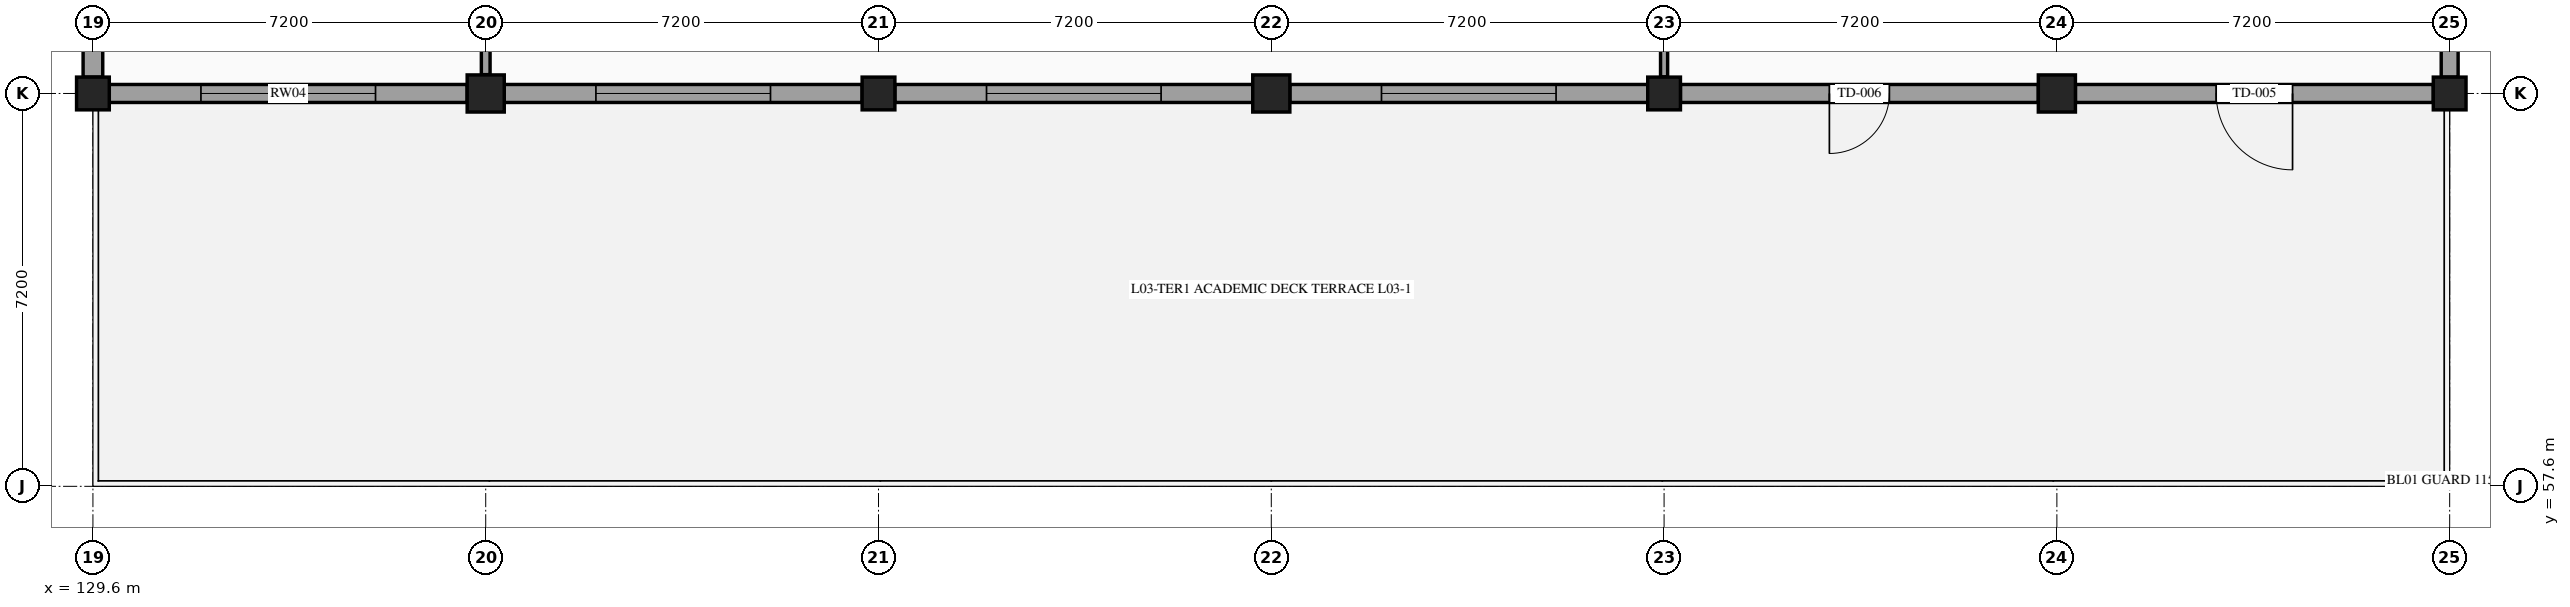
"""IFC4 building model, lengths in metres.
Left out: names, types, materials, properties, quantities, classifications, styles, units other than length and angle.
Written with IfcOpenShell. Run it as: python <this file> out.ifc"""

import sys

from ifc_helpers import new_model, si_unit, direction, frame, frame_2d, origin, origin_2d, place, context, subcontext, project, spatial, rectangle, extrude, element, fill, save


model = new_model("IFC4")
c1 = context("Model", 3, precision=1e-05, world=origin(), true_north=direction((0.0, 1.0)))
c2 = subcontext(c1, "Body", "Model", "MODEL_VIEW")
j1 = project(units=[si_unit("LENGTHUNIT", "METRE"), si_unit("PLANEANGLEUNIT", "RADIAN")], contexts=[c1])
p1 = place(None, origin())
s1 = spatial("IfcSite", under=j1, at=p1, CompositionType="ELEMENT")
p2 = place(p1, origin())
s2 = spatial("IfcBuilding", under=s1, at=p2, CompositionType="ELEMENT")
p3 = place(p2, frame((0.0, 0.0, 14.4)))
s3 = spatial("IfcBuildingStorey", under=s2, at=p3, CompositionType="ELEMENT", Elevation=14.4)
p4 = place(p3, frame((129.6, 64.8, 0.0), z_axis=(0.0, 0.0, 1.0), x_axis=(1.0, 0.0, 0.0)))
e1 = element("IfcColumn", 1, at=p4, inside=s3, PredefinedType="COLUMN", context=c2, shape_type="SweptSolid", body=[
    extrude(rectangle(XDim=0.6, YDim=0.6, at=origin_2d()), origin(), (0.0, 0.0, 1.0), 4.2),
])
p5 = place(p3, frame((136.8, 64.8, 0.0), z_axis=(0.0, 0.0, 1.0), x_axis=(1.0, 0.0, 0.0)))
e2 = element("IfcColumn", 2, at=p5, inside=s3, PredefinedType="COLUMN", context=c2, shape_type="SweptSolid", body=[
    extrude(rectangle(XDim=0.68, YDim=0.68, at=origin_2d()), origin(), (0.0, 0.0, 1.0), 4.2),
])
p6 = place(p3, frame((144.0, 64.8, 0.0), z_axis=(0.0, 0.0, 1.0), x_axis=(1.0, 0.0, 0.0)))
e3 = element("IfcColumn", 3, at=p6, inside=s3, PredefinedType="COLUMN", context=c2, shape_type="SweptSolid", body=[
    extrude(rectangle(XDim=0.6, YDim=0.6, at=origin_2d()), origin(), (0.0, 0.0, 1.0), 4.2),
])
p7 = place(p3, frame((151.2, 64.8, 0.0), z_axis=(0.0, 0.0, 1.0), x_axis=(1.0, 0.0, 0.0)))
e4 = element("IfcColumn", 4, at=p7, inside=s3, PredefinedType="COLUMN", context=c2, shape_type="SweptSolid", body=[
    extrude(rectangle(XDim=0.68, YDim=0.68, at=origin_2d()), origin(), (0.0, 0.0, 1.0), 4.2),
])
p8 = place(p3, frame((158.4, 64.8, 0.0), z_axis=(0.0, 0.0, 1.0), x_axis=(1.0, 0.0, 0.0)))
e5 = element("IfcColumn", 5, at=p8, inside=s3, PredefinedType="COLUMN", context=c2, shape_type="SweptSolid", body=[
    extrude(rectangle(XDim=0.6, YDim=0.6, at=origin_2d()), origin(), (0.0, 0.0, 1.0), 4.2),
])
p9 = place(p3, frame((165.6, 64.8, 0.0), z_axis=(0.0, 0.0, 1.0), x_axis=(1.0, 0.0, 0.0)))
e6 = element("IfcColumn", 6, at=p9, inside=s3, PredefinedType="COLUMN", context=c2, shape_type="SweptSolid", body=[
    extrude(rectangle(XDim=0.68, YDim=0.68, at=origin_2d()), origin(), (0.0, 0.0, 1.0), 4.2),
])
p10 = place(p3, frame((172.8, 64.8, 0.0), z_axis=(0.0, 0.0, 1.0), x_axis=(1.0, 0.0, 0.0)))
e7 = element("IfcColumn", 7, at=p10, inside=s3, PredefinedType="COLUMN", context=c2, shape_type="SweptSolid", body=[
    extrude(rectangle(XDim=0.6, YDim=0.6, at=origin_2d()), origin(), (0.0, 0.0, 1.0), 4.2),
])
p11 = place(p3, frame((172.8, 71.625, 0.0), z_axis=(0.0, 0.0, 1.0), x_axis=(0.0, -1.0, 0.0)))
e8 = element("IfcWall", 8, at=p11, inside=s3, PredefinedType="STANDARD", context=c2, shape_type="SweptSolid", body=[
    extrude(rectangle(XDim=6.525, YDim=0.31, at=frame_2d((3.262, 0.0))), origin(), (0.0, 0.0, 1.0), 3.11),
])
p12 = place(p11, frame((1.163, 0.0, 0.98)))
e9 = element("IfcOpeningElement", 9, at=p12, cuts=e8, PredefinedType="OPENING", context=c2, shape_type="SweptSolid", body=[
    extrude(rectangle(XDim=4.2, YDim=1.5, at=frame_2d((2.1, 0.75))), frame((0.0, 0.165, 0.0), z_axis=(0.0, -1.0, 0.0), x_axis=(1.0, 0.0, 0.0)), (0.0, 0.0, 1.0), 0.33),
])
p13 = place(p3, frame((172.5, 64.8, 0.0), z_axis=(0.0, 0.0, 1.0), x_axis=(-1.0, 0.0, 0.0)))
e10 = element("IfcWall", 10, at=p13, inside=s3, PredefinedType="STANDARD", context=c2, shape_type="SweptSolid", body=[
    extrude(rectangle(XDim=6.56, YDim=0.33, at=frame_2d((3.28, 0.0))), origin(), (0.0, 0.0, 1.0), 3.16),
])
p14 = place(p13, frame((2.58, 0.0, 0.0)))
e11 = element("IfcOpeningElement", 11, at=p14, cuts=e10, PredefinedType="OPENING", context=c2, shape_type="SweptSolid", body=[
    extrude(rectangle(XDim=1.4, YDim=2.25, at=frame_2d((0.7, 1.125))), frame((0.0, 0.175, 0.0), z_axis=(0.0, -1.0, 0.0), x_axis=(1.0, 0.0, 0.0)), (0.0, 0.0, 1.0), 0.35),
])
p15 = place(p3, frame((165.26, 64.8, 0.0), z_axis=(0.0, 0.0, 1.0), x_axis=(-1.0, 0.0, 0.0)))
e12 = element("IfcWall", 12, at=p15, inside=s3, PredefinedType="STANDARD", context=c2, shape_type="SweptSolid", body=[
    extrude(rectangle(XDim=6.56, YDim=0.33, at=frame_2d((3.28, 0.0))), origin(), (0.0, 0.0, 1.0), 3.16),
])
p16 = place(p15, frame((2.73, 0.0, 0.0)))
e13 = element("IfcOpeningElement", 13, at=p16, cuts=e12, PredefinedType="OPENING", context=c2, shape_type="SweptSolid", body=[
    extrude(rectangle(XDim=1.1, YDim=2.2, at=frame_2d((0.55, 1.1))), frame((0.0, 0.175, 0.0), z_axis=(0.0, -1.0, 0.0), x_axis=(1.0, 0.0, 0.0)), (0.0, 0.0, 1.0), 0.35),
])
p17 = place(p3, frame((158.1, 64.8, 0.0), z_axis=(0.0, 0.0, 1.0), x_axis=(-1.0, 0.0, 0.0)))
e14 = element("IfcWall", 14, at=p17, inside=s3, PredefinedType="STANDARD", context=c2, shape_type="SweptSolid", body=[
    extrude(rectangle(XDim=6.56, YDim=0.33, at=frame_2d((3.28, 0.0))), origin(), (0.0, 0.0, 1.0), 3.16),
])
p18 = place(p17, frame((1.68, 0.0, 0.95)))
e15 = element("IfcOpeningElement", 15, at=p18, cuts=e14, PredefinedType="OPENING", context=c2, shape_type="SweptSolid", body=[
    extrude(rectangle(XDim=3.2, YDim=1.45, at=frame_2d((1.6, 0.725))), frame((0.0, 0.175, 0.0), z_axis=(0.0, -1.0, 0.0), x_axis=(1.0, 0.0, 0.0)), (0.0, 0.0, 1.0), 0.35),
])
p19 = place(p3, frame((150.86, 64.8, 0.0), z_axis=(0.0, 0.0, 1.0), x_axis=(-1.0, 0.0, 0.0)))
e16 = element("IfcWall", 16, at=p19, inside=s3, PredefinedType="STANDARD", context=c2, shape_type="SweptSolid", body=[
    extrude(rectangle(XDim=6.56, YDim=0.33, at=frame_2d((3.28, 0.0))), origin(), (0.0, 0.0, 1.0), 3.16),
])
p20 = place(p19, frame((1.68, 0.0, 0.95)))
e17 = element("IfcOpeningElement", 17, at=p20, cuts=e16, PredefinedType="OPENING", context=c2, shape_type="SweptSolid", body=[
    extrude(rectangle(XDim=3.2, YDim=1.45, at=frame_2d((1.6, 0.725))), frame((0.0, 0.175, 0.0), z_axis=(0.0, -1.0, 0.0), x_axis=(1.0, 0.0, 0.0)), (0.0, 0.0, 1.0), 0.35),
])
p21 = place(p3, frame((143.7, 64.8, 0.0), z_axis=(0.0, 0.0, 1.0), x_axis=(-1.0, 0.0, 0.0)))
e18 = element("IfcWall", 18, at=p21, inside=s3, PredefinedType="STANDARD", context=c2, shape_type="SweptSolid", body=[
    extrude(rectangle(XDim=6.56, YDim=0.33, at=frame_2d((3.28, 0.0))), origin(), (0.0, 0.0, 1.0), 3.16),
])
p22 = place(p21, frame((1.68, 0.0, 0.95)))
e19 = element("IfcOpeningElement", 19, at=p22, cuts=e18, PredefinedType="OPENING", context=c2, shape_type="SweptSolid", body=[
    extrude(rectangle(XDim=3.2, YDim=1.45, at=frame_2d((1.6, 0.725))), frame((0.0, 0.175, 0.0), z_axis=(0.0, -1.0, 0.0), x_axis=(1.0, 0.0, 0.0)), (0.0, 0.0, 1.0), 0.35),
])
p23 = place(p3, frame((136.46, 64.8, 0.0), z_axis=(0.0, 0.0, 1.0), x_axis=(-1.0, 0.0, 0.0)))
e20 = element("IfcWall", 20, at=p23, inside=s3, PredefinedType="STANDARD", context=c2, shape_type="SweptSolid", body=[
    extrude(rectangle(XDim=6.56, YDim=0.33, at=frame_2d((3.28, 0.0))), origin(), (0.0, 0.0, 1.0), 3.94),
])
p24 = place(p23, frame((1.68, 0.0, 0.95)))
e21 = element("IfcOpeningElement", 21, at=p24, cuts=e20, PredefinedType="OPENING", context=c2, shape_type="SweptSolid", body=[
    extrude(rectangle(XDim=3.2, YDim=1.45, at=frame_2d((1.6, 0.725))), frame((0.0, 0.175, 0.0), z_axis=(0.0, -1.0, 0.0), x_axis=(1.0, 0.0, 0.0)), (0.0, 0.0, 1.0), 0.35),
])
p25 = place(p3, frame((129.6, 65.1, 0.0), z_axis=(0.0, 0.0, 1.0), x_axis=(0.0, 1.0, 0.0)))
e22 = element("IfcWall", 22, at=p25, inside=s3, PredefinedType="STANDARD", context=c2, shape_type="SweptSolid", body=[
    extrude(rectangle(XDim=6.525, YDim=0.36, at=frame_2d((3.262, 0.0))), origin(), (0.0, 0.0, 1.0), 3.94),
])
p26 = place(p25, frame((1.357, 0.0, 1.15)))
e23 = element("IfcOpeningElement", 23, at=p26, cuts=e22, PredefinedType="OPENING", context=c2, shape_type="SweptSolid", body=[
    extrude(rectangle(XDim=1.2, YDim=1.35, at=frame_2d((0.6, 0.675))), frame((0.0, 0.19, 0.0), z_axis=(0.0, -1.0, 0.0), x_axis=(1.0, 0.0, 0.0)), (0.0, 0.0, 1.0), 0.38),
])
p27 = place(p25, frame((3.968, 0.0, 1.15)))
e24 = element("IfcOpeningElement", 24, at=p27, cuts=e22, PredefinedType="OPENING", context=c2, shape_type="SweptSolid", body=[
    extrude(rectangle(XDim=1.2, YDim=1.35, at=frame_2d((0.6, 0.675))), frame((0.0, 0.19, 0.0), z_axis=(0.0, -1.0, 0.0), x_axis=(1.0, 0.0, 0.0)), (0.0, 0.0, 1.0), 0.38),
])
p28 = place(p3, frame((136.8, 65.145, 0.0), z_axis=(0.0, 0.0, 1.0), x_axis=(0.0, 1.0, 0.0)))
e25 = element("IfcWall", 25, at=p28, inside=s3, PredefinedType="PARTITIONING", context=c2, shape_type="SweptSolid", body=[
    extrude(rectangle(XDim=6.525, YDim=0.16, at=frame_2d((3.262, 0.0))), origin(), (0.0, 0.0, 1.0), 3.11),
])
p29 = place(p28, frame((2.623, 0.0, 0.0)))
e26 = element("IfcOpeningElement", 26, at=p29, cuts=e25, PredefinedType="OPENING", context=c2, shape_type="SweptSolid", body=[
    extrude(rectangle(XDim=1.28, YDim=2.24, at=frame_2d((0.64, 1.12))), frame((0.0, 0.09, 0.0), z_axis=(0.0, -1.0, 0.0), x_axis=(1.0, 0.0, 0.0)), (0.0, 0.0, 1.0), 0.18),
])
p30 = place(p3, frame((158.4, 65.105, 0.0), z_axis=(0.0, 0.0, 1.0), x_axis=(0.0, 1.0, 0.0)))
e27 = element("IfcWall", 27, at=p30, inside=s3, PredefinedType="PARTITIONING", context=c2, shape_type="SweptSolid", body=[
    extrude(rectangle(XDim=6.515, YDim=0.13, at=frame_2d((3.258, 0.0))), origin(), (0.0, 0.0, 1.0), 3.22),
])
p31 = place(p30, frame((2.708, 0.0, 0.0)))
e28 = element("IfcOpeningElement", 28, at=p31, cuts=e27, PredefinedType="OPENING", context=c2, shape_type="SweptSolid", body=[
    extrude(rectangle(XDim=1.1, YDim=2.15, at=frame_2d((0.55, 1.075))), frame((0.0, 0.075, 0.0), z_axis=(0.0, -1.0, 0.0), x_axis=(1.0, 0.0, 0.0)), (0.0, 0.0, 1.0), 0.15),
])
p32 = place(p14, origin())
e29 = element("IfcDoor", 29, at=p32, inside=s3, OperationType="SINGLE_SWING_LEFT", PredefinedType="DOOR", context=c2, shape_type="SweptSolid", body=[
    extrude(rectangle(XDim=1.4, YDim=2.25, at=frame_2d((0.7, 1.125))), frame((0.0, 0.025, 0.0), z_axis=(0.0, -1.0, 0.0), x_axis=(1.0, 0.0, 0.0)), (0.0, 0.0, 1.0), 0.05),
])
fill(e11, e29)
p33 = place(p16, origin())
e30 = element("IfcDoor", 30, at=p33, inside=s3, OperationType="SINGLE_SWING_RIGHT", PredefinedType="DOOR", context=c2, shape_type="SweptSolid", body=[
    extrude(rectangle(XDim=1.1, YDim=2.2, at=frame_2d((0.55, 1.1))), frame((0.0, 0.025, 0.0), z_axis=(0.0, -1.0, 0.0), x_axis=(1.0, 0.0, 0.0)), (0.0, 0.0, 1.0), 0.05),
])
fill(e13, e30)
p34 = place(p18, origin())
e31 = element("IfcWindow", 31, at=p34, inside=s3, PartitioningType="SINGLE_PANEL", PredefinedType="WINDOW", context=c2, shape_type="SweptSolid", body=[
    extrude(rectangle(XDim=3.2, YDim=1.45, at=frame_2d((1.6, 0.725))), frame((0.0, 0.03, 0.0), z_axis=(0.0, -1.0, 0.0), x_axis=(1.0, 0.0, 0.0)), (0.0, 0.0, 1.0), 0.06),
])
fill(e15, e31)
p35 = place(p20, origin())
e32 = element("IfcWindow", 32, at=p35, inside=s3, PartitioningType="SINGLE_PANEL", PredefinedType="WINDOW", context=c2, shape_type="SweptSolid", body=[
    extrude(rectangle(XDim=3.2, YDim=1.45, at=frame_2d((1.6, 0.725))), frame((0.0, 0.03, 0.0), z_axis=(0.0, -1.0, 0.0), x_axis=(1.0, 0.0, 0.0)), (0.0, 0.0, 1.0), 0.06),
])
fill(e17, e32)
p36 = place(p22, origin())
e33 = element("IfcWindow", 33, at=p36, inside=s3, PartitioningType="SINGLE_PANEL", PredefinedType="WINDOW", context=c2, shape_type="SweptSolid", body=[
    extrude(rectangle(XDim=3.2, YDim=1.45, at=frame_2d((1.6, 0.725))), frame((0.0, 0.03, 0.0), z_axis=(0.0, -1.0, 0.0), x_axis=(1.0, 0.0, 0.0)), (0.0, 0.0, 1.0), 0.06),
])
fill(e19, e33)
p37 = place(p24, origin())
e34 = element("IfcWindow", 34, at=p37, inside=s3, PartitioningType="SINGLE_PANEL", PredefinedType="WINDOW", context=c2, shape_type="SweptSolid", body=[
    extrude(rectangle(XDim=3.2, YDim=1.45, at=frame_2d((1.6, 0.725))), frame((0.0, 0.03, 0.0), z_axis=(0.0, -1.0, 0.0), x_axis=(1.0, 0.0, 0.0)), (0.0, 0.0, 1.0), 0.06),
])
fill(e21, e34)
save(model, sys.argv[1])
